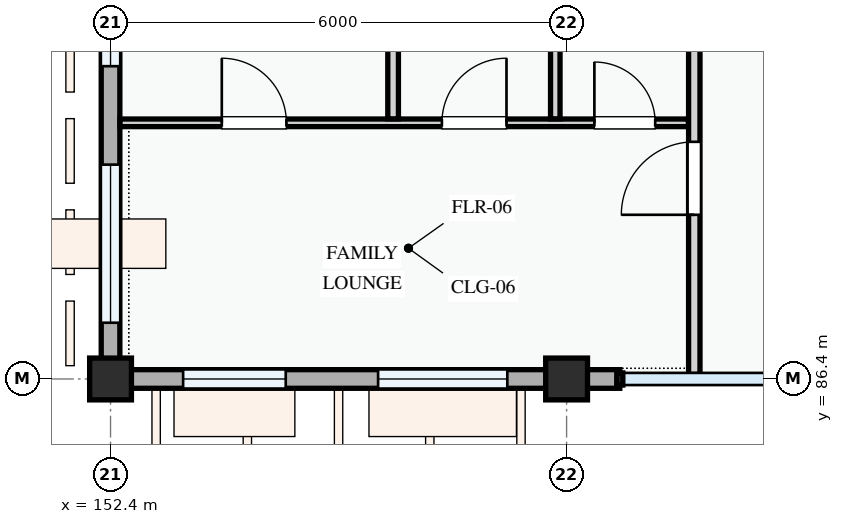
"""IFC4 building model, lengths in metres.
Left out: names, types, materials, properties, quantities, classifications, styles, units other than length and angle.
Written with IfcOpenShell. Run it as: python <this file> out.ifc"""

import sys

from ifc_helpers import new_model, si_unit, direction, frame, frame_2d, origin, origin_2d, place, context, subcontext, project, spatial, rectangle, extrude, element, fill, save


model = new_model("IFC4")
c1 = context("Model", 3, precision=1e-05, world=origin(), true_north=direction((0.0, 1.0)))
c2 = subcontext(c1, "Body", "Model", "MODEL_VIEW")
j1 = project(units=[si_unit("LENGTHUNIT", "METRE"), si_unit("PLANEANGLEUNIT", "RADIAN")], contexts=[c1])
p1 = place(None, origin())
s1 = spatial("IfcSite", under=j1, at=p1, CompositionType="ELEMENT")
p2 = place(p1, origin())
s2 = spatial("IfcBuilding", under=s1, at=p2, CompositionType="ELEMENT")
p3 = place(p2, frame((0.0, 0.0, 37.8)))
s3 = spatial("IfcBuildingStorey", under=s2, at=p3, CompositionType="ELEMENT", Elevation=37.8)
for number, where, z_axis, x_axis in (
    (1, (152.4, 86.4, 0.0), (0.0, 0.0, 1.0), (1.0, 0.0, 0.0)),
    (2, (158.4, 86.4, 0.0), (0.0, 0.0, 1.0), (1.0, 0.0, 0.0)),
):
    element("IfcColumn", number, at=place(p3, frame(where, z_axis=z_axis, x_axis=x_axis)), inside=s3, PredefinedType="COLUMN", context=c2, shape_type="SweptSolid", body=[
        extrude(rectangle(XDim=0.55, YDim=0.55, at=origin_2d()), origin(), (0.0, 0.0, 1.0), 3.3),
    ])
p4 = place(p3, frame((152.4, 94.8, 0.0), z_axis=(0.0, 0.0, 1.0), x_axis=(0.0, -1.0, 0.0)))
e3 = element("IfcWall", 3, at=p4, inside=s3, PredefinedType="STANDARD", context=c2, shape_type="SweptSolid", body=[
    extrude(rectangle(XDim=8.4, YDim=0.245, at=frame_2d((4.2, 0.0))), origin(), (0.0, 0.0, 1.0), 2.425),
])
p5 = place(p4, frame((0.48, 0.0, 0.78)))
e4 = element("IfcOpeningElement", 4, at=p5, cuts=e3, PredefinedType="OPENING", context=c2, shape_type="SweptSolid", body=[
    extrude(rectangle(XDim=0.95, YDim=1.15, at=frame_2d((0.475, 0.575))), frame((0.0, 0.133, 0.0), z_axis=(0.0, -1.0, 0.0), x_axis=(1.0, 0.0, 0.0)), (0.0, 0.0, 1.0), 0.265),
])
p6 = place(p4, frame((2.465, 0.0, 0.78)))
e5 = element("IfcOpeningElement", 5, at=p6, cuts=e3, PredefinedType="OPENING", context=c2, shape_type="SweptSolid", body=[
    extrude(rectangle(XDim=1.82, YDim=1.46, at=frame_2d((0.91, 0.73))), frame((0.0, 0.133, 0.0), z_axis=(0.0, -1.0, 0.0), x_axis=(1.0, 0.0, 0.0)), (0.0, 0.0, 1.0), 0.265),
])
p7 = place(p4, frame((5.58, 0.0, 0.78)))
e6 = element("IfcOpeningElement", 6, at=p7, cuts=e3, PredefinedType="OPENING", context=c2, shape_type="SweptSolid", body=[
    extrude(rectangle(XDim=2.08, YDim=1.52, at=frame_2d((1.04, 0.76))), frame((0.0, 0.133, 0.0), z_axis=(0.0, -1.0, 0.0), x_axis=(1.0, 0.0, 0.0)), (0.0, 0.0, 1.0), 0.265),
])
p8 = place(p3, frame((152.4, 86.4, 0.0), z_axis=(0.0, 0.0, 1.0), x_axis=(1.0, 0.0, 0.0)))
e7 = element("IfcWall", 7, at=p8, inside=s3, PredefinedType="STANDARD", context=c2, shape_type="SweptSolid", body=[
    extrude(rectangle(XDim=6.0, YDim=0.245, at=frame_2d((3.0, 0.0))), origin(), (0.0, 0.0, 1.0), 2.525),
])
p9 = place(p8, frame((0.955, 0.0, 0.78)))
e8 = element("IfcOpeningElement", 8, at=p9, cuts=e7, PredefinedType="OPENING", context=c2, shape_type="SweptSolid", body=[
    extrude(rectangle(XDim=1.35, YDim=1.55, at=frame_2d((0.675, 0.775))), frame((0.0, 0.133, 0.0), z_axis=(0.0, -1.0, 0.0), x_axis=(1.0, 0.0, 0.0)), (0.0, 0.0, 1.0), 0.265),
])
p10 = place(p8, frame((3.52, 0.0, 0.78)))
e9 = element("IfcOpeningElement", 9, at=p10, cuts=e7, PredefinedType="OPENING", context=c2, shape_type="SweptSolid", body=[
    extrude(rectangle(XDim=1.7, YDim=1.6, at=frame_2d((0.85, 0.8))), frame((0.0, 0.133, 0.0), z_axis=(0.0, -1.0, 0.0), x_axis=(1.0, 0.0, 0.0)), (0.0, 0.0, 1.0), 0.265),
])
p11 = place(p3, frame((158.4, 86.4, 0.0), z_axis=(0.0, 0.0, 1.0), x_axis=(1.0, 0.0, 0.0)))
e10 = element("IfcWall", 10, at=p11, inside=s3, PredefinedType="STANDARD", context=c2, shape_type="SweptSolid", body=[
    extrude(rectangle(XDim=0.7, YDim=0.245, at=frame_2d((0.35, 0.0))), origin(), (0.0, 0.0, 1.0), 2.375),
])
p12 = place(p3, frame((152.524, 89.77, 0.0), z_axis=(0.0, 0.0, 1.0), x_axis=(1.0, 0.0, 0.0)))
e11 = element("IfcWall", 11, at=p12, inside=s3, PredefinedType="PARTITIONING", context=c2, shape_type="SweptSolid", body=[
    extrude(rectangle(XDim=7.479, YDim=0.1, at=frame_2d((3.739, 0.0))), origin(), (0.0, 0.0, 1.0), 3.0),
])
p13 = place(p12, frame((1.339, 0.0, 0.0)))
e12 = element("IfcOpeningElement", 12, at=p13, cuts=e11, PredefinedType="OPENING", context=c2, shape_type="SweptSolid", body=[
    extrude(rectangle(XDim=0.85, YDim=2.1, at=frame_2d((0.425, 1.05))), frame((0.0, 0.06, 0.0), z_axis=(0.0, -1.0, 0.0), x_axis=(1.0, 0.0, 0.0)), (0.0, 0.0, 1.0), 0.12),
])
p14 = place(p12, frame((4.235, 0.0, 0.0)))
e13 = element("IfcOpeningElement", 13, at=p14, cuts=e11, PredefinedType="OPENING", context=c2, shape_type="SweptSolid", body=[
    extrude(rectangle(XDim=0.85, YDim=2.1, at=frame_2d((0.425, 1.05))), frame((0.0, 0.06, 0.0), z_axis=(0.0, -1.0, 0.0), x_axis=(1.0, 0.0, 0.0)), (0.0, 0.0, 1.0), 0.12),
])
p15 = place(p12, frame((6.241, 0.0, 0.0)))
e14 = element("IfcOpeningElement", 14, at=p15, cuts=e11, PredefinedType="OPENING", context=c2, shape_type="SweptSolid", body=[
    extrude(rectangle(XDim=0.8, YDim=2.1, at=frame_2d((0.4, 1.05))), frame((0.0, 0.06, 0.0), z_axis=(0.0, -1.0, 0.0), x_axis=(1.0, 0.0, 0.0)), (0.0, 0.0, 1.0), 0.12),
])
p16 = place(p3, frame((156.118, 89.822, 0.0), z_axis=(0.0, 0.0, 1.0), x_axis=(0.0, 1.0, 0.0)))
e15 = element("IfcWall", 15, at=p16, inside=s3, PredefinedType="PARTITIONING", context=c2, shape_type="SweptSolid", body=[
    extrude(rectangle(XDim=3.156, YDim=0.14, at=frame_2d((1.578, 0.0))), origin(), (0.0, 0.0, 1.0), 3.0),
])
p17 = place(p3, frame((158.251, 89.822, 0.0), z_axis=(0.0, 0.0, 1.0), x_axis=(0.0, 1.0, 0.0)))
e16 = element("IfcWall", 16, at=p17, inside=s3, PredefinedType="PARTITIONING", context=c2, shape_type="SweptSolid", body=[
    extrude(rectangle(XDim=3.156, YDim=0.125, at=frame_2d((1.578, 0.0))), origin(), (0.0, 0.0, 1.0), 2.425),
])
p18 = place(p3, frame((160.08, 86.46, 0.0), z_axis=(0.0, 0.0, 1.0), x_axis=(0.0, 1.0, 0.0)))
e17 = element("IfcWall", 17, at=p18, inside=s3, PredefinedType="PARTITIONING", context=c2, shape_type="SweptSolid", body=[
    extrude(rectangle(XDim=22.88, YDim=0.15, at=frame_2d((11.44, 0.0))), origin(), (0.0, 0.0, 1.0), 3.0),
])
p19 = place(p18, frame((2.1, 0.0, 0.0)))
e18 = element("IfcOpeningElement", 18, at=p19, cuts=e17, PredefinedType="OPENING", context=c2, shape_type="SweptSolid", body=[
    extrude(rectangle(XDim=0.96, YDim=2.12, at=frame_2d((0.48, 1.06))), frame((0.0, 0.085, 0.0), z_axis=(0.0, -1.0, 0.0), x_axis=(1.0, 0.0, 0.0)), (0.0, 0.0, 1.0), 0.17),
])
p20 = place(p18, frame((10.135, 0.0, 0.0)))
e19 = element("IfcOpeningElement", 19, at=p20, cuts=e17, PredefinedType="OPENING", context=c2, shape_type="SweptSolid", body=[
    extrude(rectangle(XDim=0.92, YDim=2.1, at=frame_2d((0.46, 1.05))), frame((0.0, 0.085, 0.0), z_axis=(0.0, -1.0, 0.0), x_axis=(1.0, 0.0, 0.0)), (0.0, 0.0, 1.0), 0.17),
])
p21 = place(p18, frame((18.083, 0.0, 0.0)))
e20 = element("IfcOpeningElement", 20, at=p21, cuts=e17, PredefinedType="OPENING", context=c2, shape_type="SweptSolid", body=[
    extrude(rectangle(XDim=0.92, YDim=2.1, at=frame_2d((0.46, 1.05))), frame((0.0, 0.085, 0.0), z_axis=(0.0, -1.0, 0.0), x_axis=(1.0, 0.0, 0.0)), (0.0, 0.0, 1.0), 0.17),
])
p22 = place(p6, origin())
e21 = element("IfcWindow", 21, at=p22, inside=s3, PartitioningType="DOUBLE_PANEL_VERTICAL", PredefinedType="WINDOW", context=c2, shape_type="SweptSolid", body=[
    extrude(rectangle(XDim=1.82, YDim=1.46, at=frame_2d((0.91, 0.73))), frame((0.0, 0.03, 0.0), z_axis=(0.0, -1.0, 0.0), x_axis=(1.0, 0.0, 0.0)), (0.0, 0.0, 1.0), 0.06),
])
fill(e5, e21)
p23 = place(p7, origin())
e22 = element("IfcWindow", 22, at=p23, inside=s3, PartitioningType="DOUBLE_PANEL_VERTICAL", PredefinedType="WINDOW", context=c2, shape_type="SweptSolid", body=[
    extrude(rectangle(XDim=2.08, YDim=1.52, at=frame_2d((1.04, 0.76))), frame((0.0, 0.03, 0.0), z_axis=(0.0, -1.0, 0.0), x_axis=(1.0, 0.0, 0.0)), (0.0, 0.0, 1.0), 0.06),
])
fill(e6, e22)
p24 = place(p9, origin())
e23 = element("IfcWindow", 23, at=p24, inside=s3, PartitioningType="SINGLE_PANEL", PredefinedType="WINDOW", context=c2, shape_type="SweptSolid", body=[
    extrude(rectangle(XDim=1.35, YDim=1.55, at=frame_2d((0.675, 0.775))), frame((0.0, 0.03, 0.0), z_axis=(0.0, -1.0, 0.0), x_axis=(1.0, 0.0, 0.0)), (0.0, 0.0, 1.0), 0.06),
])
fill(e8, e23)
p25 = place(p10, origin())
e24 = element("IfcWindow", 24, at=p25, inside=s3, PartitioningType="DOUBLE_PANEL_VERTICAL", PredefinedType="WINDOW", context=c2, shape_type="SweptSolid", body=[
    extrude(rectangle(XDim=1.7, YDim=1.6, at=frame_2d((0.85, 0.8))), frame((0.0, 0.03, 0.0), z_axis=(0.0, -1.0, 0.0), x_axis=(1.0, 0.0, 0.0)), (0.0, 0.0, 1.0), 0.06),
])
fill(e9, e24)
p26 = place(p13, origin())
e25 = element("IfcDoor", 25, at=p26, inside=s3, OperationType="SINGLE_SWING_LEFT", PredefinedType="DOOR", context=c2, shape_type="SweptSolid", body=[
    extrude(rectangle(XDim=0.85, YDim=2.1, at=frame_2d((0.425, 1.05))), frame((0.0, 0.025, 0.0), z_axis=(0.0, -1.0, 0.0), x_axis=(1.0, 0.0, 0.0)), (0.0, 0.0, 1.0), 0.05),
])
fill(e12, e25)
p27 = place(p14, origin())
e26 = element("IfcDoor", 26, at=p27, inside=s3, OperationType="SINGLE_SWING_RIGHT", PredefinedType="DOOR", context=c2, shape_type="SweptSolid", body=[
    extrude(rectangle(XDim=0.85, YDim=2.1, at=frame_2d((0.425, 1.05))), frame((0.0, 0.025, 0.0), z_axis=(0.0, -1.0, 0.0), x_axis=(1.0, 0.0, 0.0)), (0.0, 0.0, 1.0), 0.05),
])
fill(e13, e26)
p28 = place(p15, origin())
e27 = element("IfcDoor", 27, at=p28, inside=s3, OperationType="SINGLE_SWING_LEFT", PredefinedType="DOOR", context=c2, shape_type="SweptSolid", body=[
    extrude(rectangle(XDim=0.8, YDim=2.1, at=frame_2d((0.4, 1.05))), frame((0.0, 0.025, 0.0), z_axis=(0.0, -1.0, 0.0), x_axis=(1.0, 0.0, 0.0)), (0.0, 0.0, 1.0), 0.05),
])
fill(e14, e27)
p29 = place(p19, origin())
e28 = element("IfcDoor", 28, at=p29, inside=s3, OperationType="SINGLE_SWING_LEFT", PredefinedType="DOOR", context=c2, shape_type="SweptSolid", body=[
    extrude(rectangle(XDim=0.96, YDim=2.12, at=frame_2d((0.48, 1.06))), frame((0.0, 0.025, 0.0), z_axis=(0.0, -1.0, 0.0), x_axis=(1.0, 0.0, 0.0)), (0.0, 0.0, 1.0), 0.05),
])
fill(e18, e28)
save(model, sys.argv[1])
